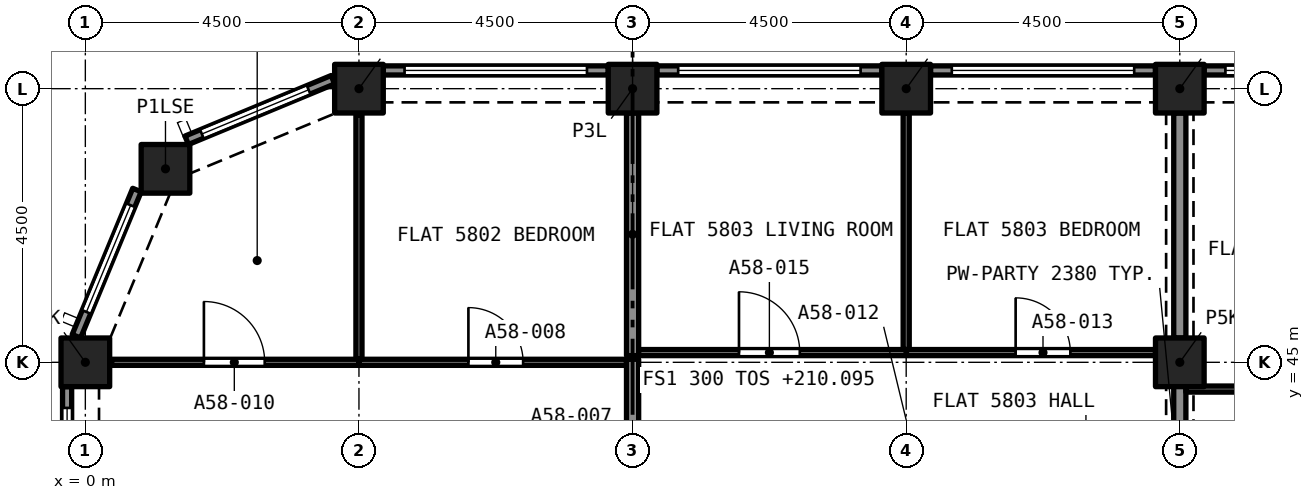
"""IFC4 building model, lengths in metres.
Left out: names, types, materials, properties, quantities, classifications, styles, units other than length and angle.
Written with IfcOpenShell. Run it as: python <this file> out.ifc"""

import sys

from ifc_helpers import new_model, si_unit, direction, frame, frame_2d, origin, origin_2d, place, context, subcontext, project, spatial, rectangle, extrude, element, fill, save


model = new_model("IFC4")
c1 = context("Model", 3, precision=1e-05, world=origin(), true_north=direction((0.0, 1.0)))
c2 = subcontext(c1, "Body", "Model", "MODEL_VIEW")
j1 = project(units=[si_unit("LENGTHUNIT", "METRE"), si_unit("PLANEANGLEUNIT", "RADIAN")], contexts=[c1])
p1 = place(None, origin())
s1 = spatial("IfcSite", under=j1, at=p1, CompositionType="ELEMENT")
p2 = place(p1, origin())
s2 = spatial("IfcBuilding", under=s1, at=p2, CompositionType="ELEMENT")
p3 = place(p2, frame((0.0, 0.0, 210.095)))
s3 = spatial("IfcBuildingStorey", under=s2, at=p3, CompositionType="ELEMENT", Elevation=210.095)
for number, where, z_axis, x_axis in (
    (1, (0.0, 45.0, 0.0), (0.0, 0.0, 1.0), (1.0, 0.0, 0.0)),
    (2, (18.0, 45.0, 0.0), (0.0, 0.0, 1.0), (1.0, 0.0, 0.0)),
    (3, (1.318, 48.182, 0.0), (0.0, 0.0, 1.0), (1.0, 0.0, 0.0)),
    (4, (4.5, 49.5, 0.0), (0.0, 0.0, 1.0), (1.0, 0.0, 0.0)),
    (5, (9.0, 49.5, 0.0), (0.0, 0.0, 1.0), (1.0, 0.0, 0.0)),
    (6, (13.5, 49.5, 0.0), (0.0, 0.0, 1.0), (1.0, 0.0, 0.0)),
    (7, (18.0, 49.5, 0.0), (0.0, 0.0, 1.0), (1.0, 0.0, 0.0)),
):
    element("IfcColumn", number, at=place(p3, frame(where, z_axis=z_axis, x_axis=x_axis)), inside=s3, PredefinedType="COLUMN", context=c2, shape_type="SweptSolid", body=[
        extrude(rectangle(XDim=0.8, YDim=0.8, at=origin_2d()), origin(), (0.0, 0.0, 1.0), 3.2),
    ])
p4 = place(p3, frame((18.4, 49.8, 0.0), z_axis=(0.0, 0.0, 1.0), x_axis=(1.0, 0.0, 0.0)))
e8 = element("IfcWall", 8, at=p4, inside=s3, PredefinedType="SOLIDWALL", context=c2, shape_type="SweptSolid", body=[
    extrude(rectangle(XDim=3.7, YDim=0.15, at=frame_2d((1.85, 0.0))), origin(), (0.0, 0.0, 1.0), 3.2),
])
p5 = place(p4, frame((0.35, 0.0, 0.45)))
e9 = element("IfcOpeningElement", 9, at=p5, cuts=e8, PredefinedType="OPENING", context=c2, shape_type="SweptSolid", body=[
    extrude(rectangle(XDim=3.0, YDim=1.95, at=frame_2d((1.5, 0.975))), frame((0.0, 0.085, 0.0), z_axis=(0.0, -1.0, 0.0), x_axis=(1.0, 0.0, 0.0)), (0.0, 0.0, 1.0), 0.17),
])
p6 = place(p3, frame((13.9, 49.8, 0.0), z_axis=(0.0, 0.0, 1.0), x_axis=(1.0, 0.0, 0.0)))
e10 = element("IfcWall", 10, at=p6, inside=s3, PredefinedType="SOLIDWALL", context=c2, shape_type="SweptSolid", body=[
    extrude(rectangle(XDim=3.7, YDim=0.15, at=frame_2d((1.85, 0.0))), origin(), (0.0, 0.0, 1.0), 3.2),
])
p7 = place(p6, frame((0.35, 0.0, 0.45)))
e11 = element("IfcOpeningElement", 11, at=p7, cuts=e10, PredefinedType="OPENING", context=c2, shape_type="SweptSolid", body=[
    extrude(rectangle(XDim=3.0, YDim=1.95, at=frame_2d((1.5, 0.975))), frame((0.0, 0.085, 0.0), z_axis=(0.0, -1.0, 0.0), x_axis=(1.0, 0.0, 0.0)), (0.0, 0.0, 1.0), 0.17),
])
p8 = place(p3, frame((9.4, 49.8, 0.0), z_axis=(0.0, 0.0, 1.0), x_axis=(1.0, 0.0, 0.0)))
e12 = element("IfcWall", 12, at=p8, inside=s3, PredefinedType="SOLIDWALL", context=c2, shape_type="SweptSolid", body=[
    extrude(rectangle(XDim=3.7, YDim=0.15, at=frame_2d((1.85, 0.0))), origin(), (0.0, 0.0, 1.0), 3.2),
])
p9 = place(p8, frame((0.35, 0.0, 0.45)))
e13 = element("IfcOpeningElement", 13, at=p9, cuts=e12, PredefinedType="OPENING", context=c2, shape_type="SweptSolid", body=[
    extrude(rectangle(XDim=3.0, YDim=1.95, at=frame_2d((1.5, 0.975))), frame((0.0, 0.085, 0.0), z_axis=(0.0, -1.0, 0.0), x_axis=(1.0, 0.0, 0.0)), (0.0, 0.0, 1.0), 0.17),
])
p10 = place(p3, frame((4.9, 49.8, 0.0), z_axis=(0.0, 0.0, 1.0), x_axis=(1.0, 0.0, 0.0)))
e14 = element("IfcWall", 14, at=p10, inside=s3, PredefinedType="SOLIDWALL", context=c2, shape_type="SweptSolid", body=[
    extrude(rectangle(XDim=3.7, YDim=0.15, at=frame_2d((1.85, 0.0))), origin(), (0.0, 0.0, 1.0), 3.2),
])
p11 = place(p10, frame((0.35, 0.0, 0.45)))
e15 = element("IfcOpeningElement", 15, at=p11, cuts=e14, PredefinedType="OPENING", context=c2, shape_type="SweptSolid", body=[
    extrude(rectangle(XDim=3.0, YDim=1.95, at=frame_2d((1.5, 0.975))), frame((0.0, 0.085, 0.0), z_axis=(0.0, -1.0, 0.0), x_axis=(1.0, 0.0, 0.0)), (0.0, 0.0, 1.0), 0.17),
])
p12 = place(p3, frame((1.667, 48.651, 0.0), z_axis=(0.0, 0.0, 1.0), x_axis=(0.923885342263, 0.382669406082, 0.0)))
e16 = element("IfcWall", 16, at=p12, inside=s3, PredefinedType="SOLIDWALL", context=c2, shape_type="SweptSolid", body=[
    extrude(rectangle(XDim=2.602, YDim=0.15, at=frame_2d((1.301, 0.0))), origin(), (0.0, 0.0, 1.0), 3.2),
])
p13 = place(p12, frame((0.27, 0.0, 0.45)))
e17 = element("IfcOpeningElement", 17, at=p13, cuts=e16, PredefinedType="OPENING", context=c2, shape_type="SweptSolid", body=[
    extrude(rectangle(XDim=1.9, YDim=1.95, at=frame_2d((0.95, 0.975))), frame((0.0, 0.085, 0.0), z_axis=(0.0, -1.0, 0.0), x_axis=(1.0, 0.0, 0.0)), (0.0, 0.0, 1.0), 0.17),
])
p14 = place(p3, frame((-0.147, 45.429, 0.0), z_axis=(0.0, 0.0, 1.0), x_axis=(0.382669406082, 0.923885342263, 0.0)))
e18 = element("IfcWall", 18, at=p14, inside=s3, PredefinedType="SOLIDWALL", context=c2, shape_type="SweptSolid", body=[
    extrude(rectangle(XDim=2.602, YDim=0.15, at=frame_2d((1.301, 0.0))), origin(), (0.0, 0.0, 1.0), 3.2),
])
p15 = place(p14, frame((0.432, 0.0, 0.45)))
e19 = element("IfcOpeningElement", 19, at=p15, cuts=e18, PredefinedType="OPENING", context=c2, shape_type="SweptSolid", body=[
    extrude(rectangle(XDim=1.9, YDim=1.95, at=frame_2d((0.95, 0.975))), frame((0.0, 0.085, 0.0), z_axis=(0.0, -1.0, 0.0), x_axis=(1.0, 0.0, 0.0)), (0.0, 0.0, 1.0), 0.17),
])
p16 = place(p3, frame((-0.3, 40.9, 0.0), z_axis=(0.0, 0.0, 1.0), x_axis=(0.0, 1.0, 0.0)))
e20 = element("IfcWall", 20, at=p16, inside=s3, PredefinedType="SOLIDWALL", context=c2, shape_type="SweptSolid", body=[
    extrude(rectangle(XDim=3.7, YDim=0.15, at=frame_2d((1.85, 0.0))), origin(), (0.0, 0.0, 1.0), 3.2),
])
p17 = place(p16, frame((0.35, 0.0, 0.45)))
e21 = element("IfcOpeningElement", 21, at=p17, cuts=e20, PredefinedType="OPENING", context=c2, shape_type="SweptSolid", body=[
    extrude(rectangle(XDim=3.0, YDim=1.95, at=frame_2d((1.5, 0.975))), frame((0.0, 0.085, 0.0), z_axis=(0.0, -1.0, 0.0), x_axis=(1.0, 0.0, 0.0)), (0.0, 0.0, 1.0), 0.17),
])
p18 = place(p3, frame((4.5, 45.0, 0.0), z_axis=(0.0, 0.0, 1.0), x_axis=(1.0, 0.0, 0.0)))
e22 = element("IfcWall", 22, at=p18, inside=s3, PredefinedType="PARTITIONING", context=c2, shape_type="SweptSolid", body=[
    extrude(rectangle(XDim=4.4, YDim=0.1, at=frame_2d((2.2, 0.0))), origin(), (0.0, 0.0, 1.0), 2.9),
])
p19 = place(p18, frame((1.8, 0.0, 0.0)))
e23 = element("IfcOpeningElement", 23, at=p19, cuts=e22, PredefinedType="OPENING", context=c2, shape_type="SweptSolid", body=[
    extrude(rectangle(XDim=0.9, YDim=2.1, at=frame_2d((0.45, 1.05))), frame((0.0, 0.06, 0.0), z_axis=(0.0, -1.0, 0.0), x_axis=(1.0, 0.0, 0.0)), (0.0, 0.0, 1.0), 0.12),
])
p20 = place(p3, frame((4.5, 45.05, 0.0), z_axis=(0.0, 0.0, 1.0), x_axis=(0.0, 1.0, 0.0)))
e24 = element("IfcWall", 24, at=p20, inside=s3, PredefinedType="PARTITIONING", context=c2, shape_type="SweptSolid", body=[
    extrude(rectangle(XDim=4.017, YDim=0.1, at=frame_2d((2.009, 0.0))), origin(), (0.0, 0.0, 1.0), 2.9),
])
p21 = place(p3, frame((9.0, 45.11, 0.0), z_axis=(0.0, 0.0, 1.0), x_axis=(0.0, 1.0, 0.0)))
e25 = element("IfcWall", 25, at=p21, inside=s3, PredefinedType="PARTITIONING", context=c2, shape_type="SweptSolid", body=[
    extrude(rectangle(XDim=3.99, YDim=0.2, at=frame_2d((1.995, 0.0))), origin(), (0.0, 0.0, 1.0), 2.9),
])
p22 = place(p3, frame((0.433, 45.0, 0.0), z_axis=(0.0, 0.0, 1.0), x_axis=(1.0, 0.0, 0.0)))
e26 = element("IfcWall", 26, at=p22, inside=s3, PredefinedType="PARTITIONING", context=c2, shape_type="SweptSolid", body=[
    extrude(rectangle(XDim=4.067, YDim=0.1, at=frame_2d((2.034, 0.0))), origin(), (0.0, 0.0, 1.0), 2.9),
])
p23 = place(p22, frame((1.517, 0.0, 0.0)))
e27 = element("IfcOpeningElement", 27, at=p23, cuts=e26, PredefinedType="OPENING", context=c2, shape_type="SweptSolid", body=[
    extrude(rectangle(XDim=1.0, YDim=2.1, at=frame_2d((0.5, 1.05))), frame((0.0, 0.06, 0.0), z_axis=(0.0, -1.0, 0.0), x_axis=(1.0, 0.0, 0.0)), (0.0, 0.0, 1.0), 0.12),
])
p24 = place(p3, frame((9.0, 43.69, 0.0), z_axis=(0.0, 0.0, 1.0), x_axis=(0.0, 1.0, 0.0)))
e28 = element("IfcWall", 28, at=p24, inside=s3, PredefinedType="PARTITIONING", context=c2, shape_type="SweptSolid", body=[
    extrude(rectangle(XDim=1.36, YDim=0.2, at=frame_2d((0.68, 0.0))), origin(), (0.0, 0.0, 1.0), 2.9),
])
p25 = place(p3, frame((13.5, 45.16, 0.0), z_axis=(0.0, 0.0, 1.0), x_axis=(1.0, 0.0, 0.0)))
e29 = element("IfcWall", 29, at=p25, inside=s3, PredefinedType="PARTITIONING", context=c2, shape_type="SweptSolid", body=[
    extrude(rectangle(XDim=4.1, YDim=0.1, at=frame_2d((2.05, 0.0))), origin(), (0.0, 0.0, 1.0), 2.9),
])
p26 = place(p25, frame((1.8, 0.0, 0.0)))
e30 = element("IfcOpeningElement", 30, at=p26, cuts=e29, PredefinedType="OPENING", context=c2, shape_type="SweptSolid", body=[
    extrude(rectangle(XDim=0.9, YDim=2.1, at=frame_2d((0.45, 1.05))), frame((0.0, 0.06, 0.0), z_axis=(0.0, -1.0, 0.0), x_axis=(1.0, 0.0, 0.0)), (0.0, 0.0, 1.0), 0.12),
])
p27 = place(p3, frame((13.5, 45.21, 0.0), z_axis=(0.0, 0.0, 1.0), x_axis=(0.0, 1.0, 0.0)))
e31 = element("IfcWall", 31, at=p27, inside=s3, PredefinedType="PARTITIONING", context=c2, shape_type="SweptSolid", body=[
    extrude(rectangle(XDim=3.89, YDim=0.1, at=frame_2d((1.945, 0.0))), origin(), (0.0, 0.0, 1.0), 2.9),
])
p28 = place(p3, frame((18.0, 45.4, 0.0), z_axis=(0.0, 0.0, 1.0), x_axis=(0.0, 1.0, 0.0)))
e32 = element("IfcWall", 32, at=p28, inside=s3, PredefinedType="PARTITIONING", context=c2, shape_type="SweptSolid", body=[
    extrude(rectangle(XDim=3.7, YDim=0.2, at=frame_2d((1.85, 0.0))), origin(), (0.0, 0.0, 1.0), 2.38),
])
p29 = place(p3, frame((9.1, 45.16, 0.0), z_axis=(0.0, 0.0, 1.0), x_axis=(1.0, 0.0, 0.0)))
e33 = element("IfcWall", 33, at=p29, inside=s3, PredefinedType="PARTITIONING", context=c2, shape_type="SweptSolid", body=[
    extrude(rectangle(XDim=4.4, YDim=0.1, at=frame_2d((2.2, 0.0))), origin(), (0.0, 0.0, 1.0), 2.9),
])
p30 = place(p29, frame((1.65, 0.0, 0.0)))
e34 = element("IfcOpeningElement", 34, at=p30, cuts=e33, PredefinedType="OPENING", context=c2, shape_type="SweptSolid", body=[
    extrude(rectangle(XDim=1.0, YDim=2.1, at=frame_2d((0.5, 1.05))), frame((0.0, 0.06, 0.0), z_axis=(0.0, -1.0, 0.0), x_axis=(1.0, 0.0, 0.0)), (0.0, 0.0, 1.0), 0.12),
])
p31 = place(p3, frame((18.0, 40.9, 0.0), z_axis=(0.0, 0.0, 1.0), x_axis=(0.0, 1.0, 0.0)))
e35 = element("IfcWall", 35, at=p31, inside=s3, PredefinedType="PARTITIONING", context=c2, shape_type="SweptSolid", body=[
    extrude(rectangle(XDim=3.71, YDim=0.2, at=frame_2d((1.855, 0.0))), origin(), (0.0, 0.0, 1.0), 2.38),
])
p32 = place(p3, frame((18.1, 44.56, 0.0), z_axis=(0.0, 0.0, 1.0), x_axis=(1.0, 0.0, 0.0)))
e36 = element("IfcWall", 36, at=p32, inside=s3, PredefinedType="PARTITIONING", context=c2, shape_type="SweptSolid", body=[
    extrude(rectangle(XDim=4.4, YDim=0.1, at=frame_2d((2.2, 0.0))), origin(), (0.0, 0.0, 1.0), 2.75),
])
p33 = place(p32, frame((1.7, 0.0, 0.0)))
e37 = element("IfcOpeningElement", 37, at=p33, cuts=e36, PredefinedType="OPENING", context=c2, shape_type="SweptSolid", body=[
    extrude(rectangle(XDim=0.9, YDim=2.1, at=frame_2d((0.45, 1.05))), frame((0.0, 0.06, 0.0), z_axis=(0.0, -1.0, 0.0), x_axis=(1.0, 0.0, 0.0)), (0.0, 0.0, 1.0), 0.12),
])
p34 = place(p5, origin())
e38 = element("IfcWindow", 38, at=p34, inside=s3, PartitioningType="SINGLE_PANEL", PredefinedType="WINDOW", context=c2, shape_type="SweptSolid", body=[
    extrude(rectangle(XDim=3.0, YDim=1.95, at=frame_2d((1.5, 0.975))), frame((0.0, 0.03, 0.0), z_axis=(0.0, -1.0, 0.0), x_axis=(1.0, 0.0, 0.0)), (0.0, 0.0, 1.0), 0.06),
])
fill(e9, e38)
p35 = place(p7, origin())
e39 = element("IfcWindow", 39, at=p35, inside=s3, PartitioningType="SINGLE_PANEL", PredefinedType="WINDOW", context=c2, shape_type="SweptSolid", body=[
    extrude(rectangle(XDim=3.0, YDim=1.95, at=frame_2d((1.5, 0.975))), frame((0.0, 0.03, 0.0), z_axis=(0.0, -1.0, 0.0), x_axis=(1.0, 0.0, 0.0)), (0.0, 0.0, 1.0), 0.06),
])
fill(e11, e39)
p36 = place(p9, origin())
e40 = element("IfcWindow", 40, at=p36, inside=s3, PartitioningType="SINGLE_PANEL", PredefinedType="WINDOW", context=c2, shape_type="SweptSolid", body=[
    extrude(rectangle(XDim=3.0, YDim=1.95, at=frame_2d((1.5, 0.975))), frame((0.0, 0.03, 0.0), z_axis=(0.0, -1.0, 0.0), x_axis=(1.0, 0.0, 0.0)), (0.0, 0.0, 1.0), 0.06),
])
fill(e13, e40)
p37 = place(p11, origin())
e41 = element("IfcWindow", 41, at=p37, inside=s3, PartitioningType="SINGLE_PANEL", PredefinedType="WINDOW", context=c2, shape_type="SweptSolid", body=[
    extrude(rectangle(XDim=3.0, YDim=1.95, at=frame_2d((1.5, 0.975))), frame((0.0, 0.03, 0.0), z_axis=(0.0, -1.0, 0.0), x_axis=(1.0, 0.0, 0.0)), (0.0, 0.0, 1.0), 0.06),
])
fill(e15, e41)
p38 = place(p13, origin())
e42 = element("IfcWindow", 42, at=p38, inside=s3, PartitioningType="SINGLE_PANEL", PredefinedType="WINDOW", context=c2, shape_type="SweptSolid", body=[
    extrude(rectangle(XDim=1.9, YDim=1.95, at=frame_2d((0.95, 0.975))), frame((0.0, 0.03, 0.0), z_axis=(0.0, -1.0, 0.0), x_axis=(1.0, 0.0, 0.0)), (0.0, 0.0, 1.0), 0.06),
])
fill(e17, e42)
p39 = place(p15, origin())
e43 = element("IfcWindow", 43, at=p39, inside=s3, PartitioningType="SINGLE_PANEL", PredefinedType="WINDOW", context=c2, shape_type="SweptSolid", body=[
    extrude(rectangle(XDim=1.9, YDim=1.95, at=frame_2d((0.95, 0.975))), frame((0.0, 0.03, 0.0), z_axis=(0.0, -1.0, 0.0), x_axis=(1.0, 0.0, 0.0)), (0.0, 0.0, 1.0), 0.06),
])
fill(e19, e43)
p40 = place(p17, origin())
e44 = element("IfcWindow", 44, at=p40, inside=s3, PartitioningType="SINGLE_PANEL", PredefinedType="WINDOW", context=c2, shape_type="SweptSolid", body=[
    extrude(rectangle(XDim=3.0, YDim=1.95, at=frame_2d((1.5, 0.975))), frame((0.0, 0.03, 0.0), z_axis=(0.0, -1.0, 0.0), x_axis=(1.0, 0.0, 0.0)), (0.0, 0.0, 1.0), 0.06),
])
fill(e21, e44)
p41 = place(p19, origin())
e45 = element("IfcDoor", 45, at=p41, inside=s3, OperationType="SINGLE_SWING_RIGHT", PredefinedType="DOOR", context=c2, shape_type="SweptSolid", body=[
    extrude(rectangle(XDim=0.9, YDim=2.1, at=frame_2d((0.45, 1.05))), frame((0.0, 0.025, 0.0), z_axis=(0.0, -1.0, 0.0), x_axis=(1.0, 0.0, 0.0)), (0.0, 0.0, 1.0), 0.05),
])
fill(e23, e45)
p42 = place(p23, origin())
e46 = element("IfcDoor", 46, at=p42, inside=s3, OperationType="SINGLE_SWING_LEFT", PredefinedType="DOOR", context=c2, shape_type="SweptSolid", body=[
    extrude(rectangle(XDim=1.0, YDim=2.1, at=frame_2d((0.5, 1.05))), frame((0.0, 0.025, 0.0), z_axis=(0.0, -1.0, 0.0), x_axis=(1.0, 0.0, 0.0)), (0.0, 0.0, 1.0), 0.05),
])
fill(e27, e46)
p43 = place(p26, origin())
e47 = element("IfcDoor", 47, at=p43, inside=s3, OperationType="SINGLE_SWING_RIGHT", PredefinedType="DOOR", context=c2, shape_type="SweptSolid", body=[
    extrude(rectangle(XDim=0.9, YDim=2.1, at=frame_2d((0.45, 1.05))), frame((0.0, 0.025, 0.0), z_axis=(0.0, -1.0, 0.0), x_axis=(1.0, 0.0, 0.0)), (0.0, 0.0, 1.0), 0.05),
])
fill(e30, e47)
p44 = place(p30, origin())
e48 = element("IfcDoor", 48, at=p44, inside=s3, OperationType="SINGLE_SWING_LEFT", PredefinedType="DOOR", context=c2, shape_type="SweptSolid", body=[
    extrude(rectangle(XDim=1.0, YDim=2.1, at=frame_2d((0.5, 1.05))), frame((0.0, 0.025, 0.0), z_axis=(0.0, -1.0, 0.0), x_axis=(1.0, 0.0, 0.0)), (0.0, 0.0, 1.0), 0.05),
])
fill(e34, e48)
save(model, sys.argv[1])
